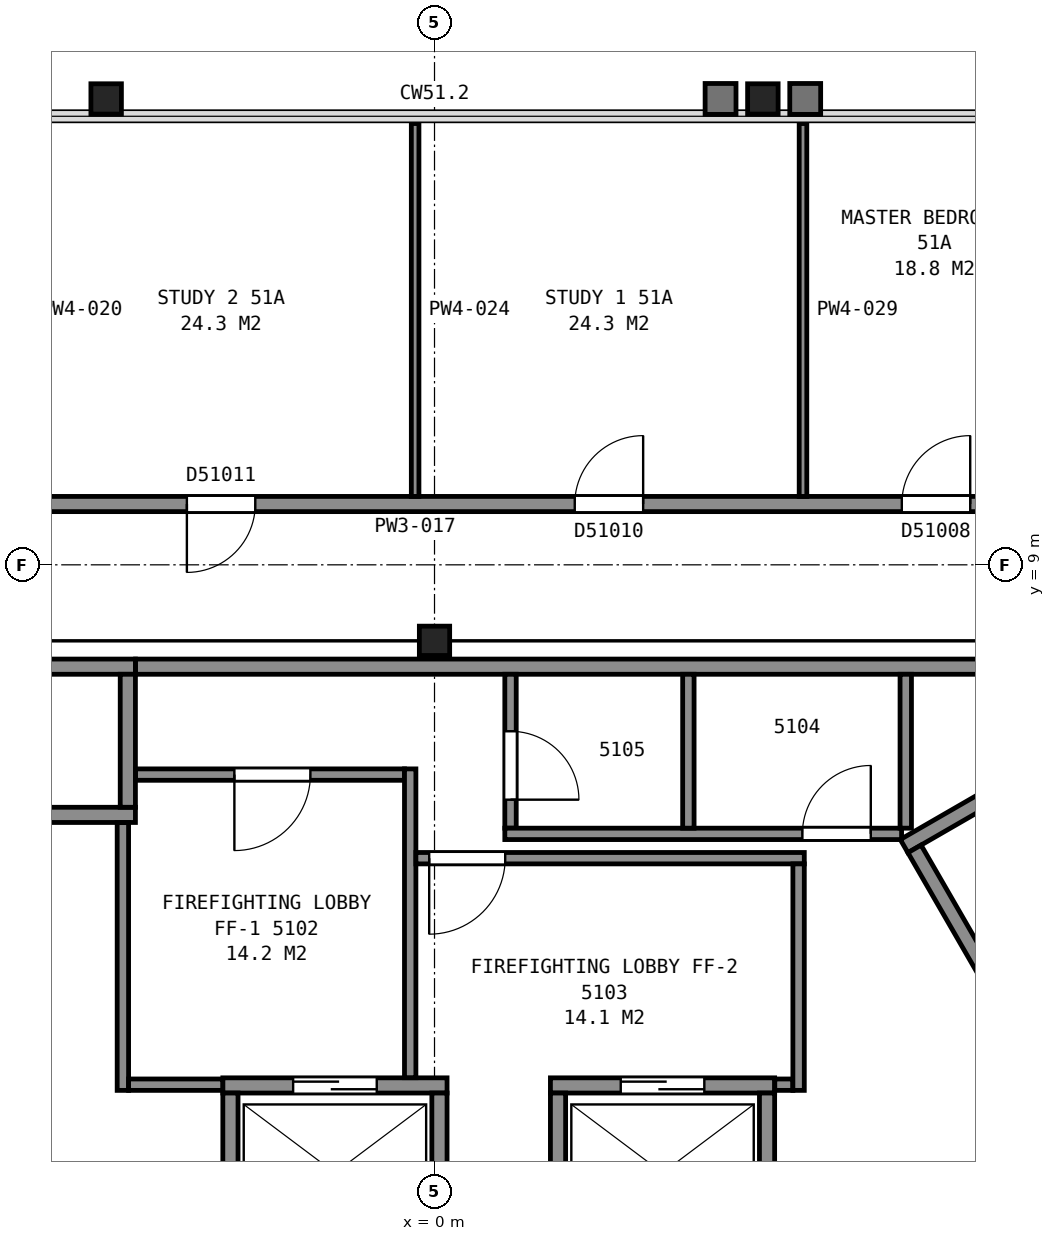
"""IFC4 building model, lengths in metres.
Left out: names, types, materials, properties, quantities, classifications, styles, units other than length and angle.
Written with IfcOpenShell. Run it as: python <this file> out.ifc"""

import sys

from ifc_helpers import new_model, si_unit, direction, frame, frame_2d, origin, origin_2d, place, context, subcontext, project, spatial, rectangle, i_section, extrude, element, fill, save


model = new_model("IFC4")
c1 = context("Model", 3, precision=1e-05, world=origin(), true_north=direction((0.0, 1.0)))
c2 = subcontext(c1, "Body", "Model", "MODEL_VIEW")
j1 = project(units=[si_unit("LENGTHUNIT", "METRE"), si_unit("PLANEANGLEUNIT", "RADIAN")], contexts=[c1])
p1 = place(None, origin())
s1 = spatial("IfcSite", under=j1, at=p1, CompositionType="ELEMENT")
p2 = place(p1, origin())
s2 = spatial("IfcBuilding", under=s1, at=p2, CompositionType="ELEMENT")
p3 = place(p2, frame((0.0, 0.0, 206.4)))
s3 = spatial("IfcBuildingStorey", under=s2, at=p3, CompositionType="ELEMENT", Elevation=206.4)
for number, where, z_axis, x_axis in (
    (1, (4.32, 15.13, 0.0), (0.0, 0.0, 1.0), (1.0, 0.0, 0.0)),
    (2, (-4.32, 15.13, 0.0), (0.0, 0.0, 1.0), (1.0, 0.0, 0.0)),
):
    element("IfcColumn", number, at=place(p3, frame(where, z_axis=z_axis, x_axis=x_axis)), inside=s3, PredefinedType="COLUMN", context=c2, shape_type="SweptSolid", body=[
        extrude(i_section(OverallWidth=0.401, OverallDepth=0.399, WebThickness=0.025, FlangeThickness=0.04, FilletRadius=0.015, at=origin_2d()), origin(), (0.0, 0.0, 1.0), 3.7),
    ])
p4 = place(p3, frame((0.0, 8.0, 0.0), z_axis=(0.0, 0.0, 1.0), x_axis=(1.0, 0.0, 0.0)))
e3 = element("IfcColumn", 3, at=p4, inside=s3, PredefinedType="COLUMN", context=c2, shape_type="SweptSolid", body=[
    extrude(i_section(OverallWidth=0.399, OverallDepth=0.386, WebThickness=0.021, FlangeThickness=0.033, FilletRadius=0.015, at=origin_2d()), origin(), (0.0, 0.0, 1.0), 3.7),
])
p5 = place(p3, frame((6.178, 5.299, 0.0), z_axis=(0.0, 0.0, 1.0), x_axis=(0.866019993635, 0.500009370536, 0.0)))
e4 = element("IfcWall", 4, at=p5, inside=s3, PredefinedType="PARTITIONING", context=c2, shape_type="SweptSolid", body=[
    extrude(rectangle(XDim=9.6, YDim=0.2, at=frame_2d((4.8, 0.0))), origin(), (0.0, 0.0, 1.0), 3.45),
])
p6 = place(p3, frame((7.715, 2.838, 0.0), z_axis=(0.0, 0.0, 1.0), x_axis=(-0.500049511043, 0.865996816683, 0.0)))
e5 = element("IfcWall", 5, at=p6, inside=s3, PredefinedType="PARTITIONING", context=c2, shape_type="SweptSolid", body=[
    extrude(rectangle(XDim=2.8, YDim=0.2, at=frame_2d((1.4, 0.0))), origin(), (0.0, 0.0, 1.0), 3.45),
])
p7 = place(p3, frame((-2.785, 2.15, 0.0), z_axis=(0.0, 0.0, 1.0), x_axis=(1.0, 0.0, 0.0)))
e6 = element("IfcWall", 6, at=p7, inside=s3, PredefinedType="PARTITIONING", context=c2, shape_type="SweptSolid", body=[
    extrude(rectangle(XDim=2.95, YDim=0.2, at=frame_2d((1.475, 0.0))), origin(), (0.0, 0.0, 1.0), 3.7),
])
p8 = place(p7, frame((0.925, 0.0, 0.0)))
e7 = element("IfcOpeningElement", 7, at=p8, cuts=e6, PredefinedType="OPENING", context=c2, shape_type="SweptSolid", body=[
    extrude(rectangle(XDim=1.1, YDim=2.1, at=frame_2d((0.55, 1.05))), frame((0.0, 0.11, 0.0), z_axis=(0.0, -1.0, 0.0), x_axis=(1.0, 0.0, 0.0)), (0.0, 0.0, 1.0), 0.22),
])
p9 = place(p3, frame((1.525, 2.15, 0.0), z_axis=(0.0, 0.0, 1.0), x_axis=(1.0, 0.0, 0.0)))
e8 = element("IfcWall", 8, at=p9, inside=s3, PredefinedType="PARTITIONING", context=c2, shape_type="SweptSolid", body=[
    extrude(rectangle(XDim=2.95, YDim=0.2, at=frame_2d((1.475, 0.0))), origin(), (0.0, 0.0, 1.0), 3.7),
])
p10 = place(p9, frame((0.925, 0.0, 0.0)))
e9 = element("IfcOpeningElement", 9, at=p10, cuts=e8, PredefinedType="OPENING", context=c2, shape_type="SweptSolid", body=[
    extrude(rectangle(XDim=1.1, YDim=2.1, at=frame_2d((0.55, 1.05))), frame((0.0, 0.11, 0.0), z_axis=(0.0, -1.0, 0.0), x_axis=(1.0, 0.0, 0.0)), (0.0, 0.0, 1.0), 0.22),
])
for number, where, z_axis, x_axis in (
    (10, (-6.285, 5.71, 0.0), (0.0, 0.0, 1.0), (1.0, 0.0, 0.0)),
    (11, (-6.285, 7.66, 0.0), (0.0, 0.0, 1.0), (1.0, 0.0, 0.0)),
):
    element("IfcWall", number, at=place(p3, frame(where, z_axis=z_axis, x_axis=x_axis)), inside=s3, PredefinedType="PARTITIONING", context=c2, shape_type="SweptSolid", body=[
        extrude(rectangle(XDim=2.35, YDim=0.2, at=frame_2d((1.175, 0.0))), origin(), (0.0, 0.0, 1.0), 3.7),
    ])
p11 = place(p3, frame((5.663, -1.612, 0.0), z_axis=(0.0, 0.0, 1.0), x_axis=(0.49998122708, 0.866036242063, 0.0)))
e12 = element("IfcWall", 12, at=p11, inside=s3, PredefinedType="PARTITIONING", context=c2, shape_type="SweptSolid", body=[
    extrude(rectangle(XDim=4.9, YDim=0.2, at=frame_2d((2.45, 0.0))), origin(), (0.0, 0.0, 1.0), 3.7),
])
for number, where, z_axis, x_axis in (
    (13, (4.375, 0.1, 0.0), (0.0, 0.0, 1.0), (0.0, 1.0, 0.0)),
    (14, (1.625, 0.1, 0.0), (0.0, 0.0, 1.0), (0.0, 1.0, 0.0)),
    (15, (0.065, 0.1, 0.0), (0.0, 0.0, 1.0), (0.0, 1.0, 0.0)),
    (16, (-2.685, 0.1, 0.0), (0.0, 0.0, 1.0), (0.0, 1.0, 0.0)),
):
    element("IfcWall", number, at=place(p3, frame(where, z_axis=z_axis, x_axis=x_axis)), inside=s3, PredefinedType="PARTITIONING", context=c2, shape_type="SweptSolid", body=[
        extrude(rectangle(XDim=1.95, YDim=0.2, at=frame_2d((0.975, 0.0))), origin(), (0.0, 0.0, 1.0), 3.7),
    ])
p12 = place(p3, frame((-4.035, 5.81, 0.0), z_axis=(0.0, 0.0, 1.0), x_axis=(0.0, 1.0, 0.0)))
e17 = element("IfcWall", 17, at=p12, inside=s3, PredefinedType="PARTITIONING", context=c2, shape_type="SweptSolid", body=[
    extrude(rectangle(XDim=1.75, YDim=0.2, at=frame_2d((0.875, 0.0))), origin(), (0.0, 0.0, 1.0), 3.7),
])
p13 = place(p3, frame((-4.1, 2.085, 0.0), z_axis=(0.0, 0.0, 1.0), x_axis=(0.0, 1.0, 0.0)))
e18 = element("IfcWall", 18, at=p13, inside=s3, PredefinedType="PARTITIONING", context=c2, shape_type="SweptSolid", body=[
    extrude(rectangle(XDim=3.523, YDim=0.15, at=frame_2d((1.761, 0.0))), origin(), (0.0, 0.0, 1.0), 3.45),
])
p14 = place(p3, frame((-4.025, 2.16, 0.0), z_axis=(0.0, 0.0, 1.0), x_axis=(1.0, 0.0, 0.0)))
e19 = element("IfcWall", 19, at=p14, inside=s3, PredefinedType="PARTITIONING", context=c2, shape_type="SweptSolid", body=[
    extrude(rectangle(XDim=1.238, YDim=0.15, at=frame_2d((0.619, 0.0))), origin(), (0.0, 0.0, 1.0), 3.45),
])
p15 = place(p3, frame((-3.933, 6.24, 0.0), z_axis=(0.0, 0.0, 1.0), x_axis=(1.0, 0.0, 0.0)))
e20 = element("IfcWall", 20, at=p15, inside=s3, PredefinedType="PARTITIONING", context=c2, shape_type="SweptSolid", body=[
    extrude(rectangle(XDim=3.538, YDim=0.15, at=frame_2d((1.769, 0.0))), origin(), (0.0, 0.0, 1.0), 3.45),
])
p16 = place(p15, frame((1.3, 0.0, 0.0)))
e21 = element("IfcOpeningElement", 21, at=p16, cuts=e20, PredefinedType="OPENING", context=c2, shape_type="SweptSolid", body=[
    extrude(rectangle(XDim=1.0, YDim=2.1, at=frame_2d((0.5, 1.05))), frame((0.0, 0.085, 0.0), z_axis=(0.0, -1.0, 0.0), x_axis=(1.0, 0.0, 0.0)), (0.0, 0.0, 1.0), 0.17),
])
p17 = place(p3, frame((-3.933, 7.66, 0.0), z_axis=(0.0, 0.0, 1.0), x_axis=(1.0, 0.0, 0.0)))
e22 = element("IfcWall", 22, at=p17, inside=s3, PredefinedType="PARTITIONING", context=c2, shape_type="SweptSolid", body=[
    extrude(rectangle(XDim=13.841, YDim=0.2, at=frame_2d((6.92, 0.0))), origin(), (0.0, 0.0, 1.0), 3.45),
])
p18 = place(p3, frame((-0.32, 2.252, 0.0), z_axis=(0.0, 0.0, 1.0), x_axis=(0.0, 1.0, 0.0)))
e23 = element("IfcWall", 23, at=p18, inside=s3, PredefinedType="PARTITIONING", context=c2, shape_type="SweptSolid", body=[
    extrude(rectangle(XDim=4.063, YDim=0.15, at=frame_2d((2.031, 0.0))), origin(), (0.0, 0.0, 1.0), 3.45),
])
p19 = place(p3, frame((-0.245, 5.14, 0.0), z_axis=(0.0, 0.0, 1.0), x_axis=(1.0, 0.0, 0.0)))
e24 = element("IfcWall", 24, at=p19, inside=s3, PredefinedType="PARTITIONING", context=c2, shape_type="SweptSolid", body=[
    extrude(rectangle(XDim=5.11, YDim=0.15, at=frame_2d((2.555, 0.0))), origin(), (0.0, 0.0, 1.0), 3.45),
])
p20 = place(p19, frame((0.175, 0.0, 0.0)))
e25 = element("IfcOpeningElement", 25, at=p20, cuts=e24, PredefinedType="OPENING", context=c2, shape_type="SweptSolid", body=[
    extrude(rectangle(XDim=1.0, YDim=2.1, at=frame_2d((0.5, 1.05))), frame((0.0, 0.085, 0.0), z_axis=(0.0, -1.0, 0.0), x_axis=(1.0, 0.0, 0.0)), (0.0, 0.0, 1.0), 0.17),
])
p21 = place(p3, frame((1.0, 7.56, 0.0), z_axis=(0.0, 0.0, 1.0), x_axis=(0.0, -1.0, 0.0)))
e26 = element("IfcWall", 26, at=p21, inside=s3, PredefinedType="PARTITIONING", context=c2, shape_type="SweptSolid", body=[
    extrude(rectangle(XDim=2.025, YDim=0.15, at=frame_2d((1.013, 0.0))), origin(), (0.0, 0.0, 1.0), 3.45),
])
p22 = place(p21, frame((0.75, 0.0, 0.0)))
e27 = element("IfcOpeningElement", 27, at=p22, cuts=e26, PredefinedType="OPENING", context=c2, shape_type="SweptSolid", body=[
    extrude(rectangle(XDim=0.9, YDim=2.1, at=frame_2d((0.45, 1.05))), frame((0.0, 0.085, 0.0), z_axis=(0.0, -1.0, 0.0), x_axis=(1.0, 0.0, 0.0)), (0.0, 0.0, 1.0), 0.17),
])
p23 = place(p3, frame((0.925, 5.46, 0.0), z_axis=(0.0, 0.0, 1.0), x_axis=(1.0, 0.0, 0.0)))
e28 = element("IfcWall", 28, at=p23, inside=s3, PredefinedType="PARTITIONING", context=c2, shape_type="SweptSolid", body=[
    extrude(rectangle(XDim=5.22, YDim=0.15, at=frame_2d((2.61, 0.0))), origin(), (0.0, 0.0, 1.0), 3.45),
])
p24 = place(p23, frame((3.915, 0.0, 0.0)))
e29 = element("IfcOpeningElement", 29, at=p24, cuts=e28, PredefinedType="OPENING", context=c2, shape_type="SweptSolid", body=[
    extrude(rectangle(XDim=0.9, YDim=2.1, at=frame_2d((0.45, 1.05))), frame((0.0, 0.085, 0.0), z_axis=(0.0, -1.0, 0.0), x_axis=(1.0, 0.0, 0.0)), (0.0, 0.0, 1.0), 0.17),
])
p25 = place(p3, frame((3.34, 5.535, 0.0), z_axis=(0.0, 0.0, 1.0), x_axis=(0.0, 1.0, 0.0)))
e30 = element("IfcWall", 30, at=p25, inside=s3, PredefinedType="PARTITIONING", context=c2, shape_type="SweptSolid", body=[
    extrude(rectangle(XDim=2.025, YDim=0.15, at=frame_2d((1.013, 0.0))), origin(), (0.0, 0.0, 1.0), 3.45),
])
p26 = place(p3, frame((4.477, 2.16, 0.0), z_axis=(0.0, 0.0, 1.0), x_axis=(1.0, 0.0, 0.0)))
e31 = element("IfcWall", 31, at=p26, inside=s3, PredefinedType="PARTITIONING", context=c2, shape_type="SweptSolid", body=[
    extrude(rectangle(XDim=0.238, YDim=0.15, at=frame_2d((0.119, 0.0))), origin(), (0.0, 0.0, 1.0), 3.45),
])
p27 = place(p3, frame((4.79, 2.085, 0.0), z_axis=(0.0, 0.0, 1.0), x_axis=(0.0, 1.0, 0.0)))
e32 = element("IfcWall", 32, at=p27, inside=s3, PredefinedType="PARTITIONING", context=c2, shape_type="SweptSolid", body=[
    extrude(rectangle(XDim=2.98, YDim=0.15, at=frame_2d((1.49, 0.0))), origin(), (0.0, 0.0, 1.0), 3.45),
])
p28 = place(p3, frame((6.2, 5.535, 0.0), z_axis=(0.0, 0.0, 1.0), x_axis=(0.0, 1.0, 0.0)))
e33 = element("IfcWall", 33, at=p28, inside=s3, PredefinedType="PARTITIONING", context=c2, shape_type="SweptSolid", body=[
    extrude(rectangle(XDim=2.025, YDim=0.15, at=frame_2d((1.013, 0.0))), origin(), (0.0, 0.0, 1.0), 3.45),
])
p29 = place(p3, frame((-4.075, -12.545, 0.0), z_axis=(0.0, 0.0, 1.0), x_axis=(-0.499999743747, 0.866025551732, 0.0)))
e34 = element("IfcWall", 34, at=p29, inside=s3, PredefinedType="PARTITIONING", context=c2, shape_type="SweptSolid", body=[
    extrude(rectangle(XDim=17.656, YDim=0.2, at=frame_2d((8.828, 0.0))), origin(), (0.0, 0.0, 1.0), 2.713),
])
p30 = place(p29, frame((9.895, 0.0, 0.0)))
e35 = element("IfcOpeningElement", 35, at=p30, cuts=e34, PredefinedType="OPENING", context=c2, shape_type="SweptSolid", body=[
    extrude(rectangle(XDim=0.9, YDim=2.1, at=frame_2d((0.45, 1.05))), frame((0.0, 0.11, 0.0), z_axis=(0.0, -1.0, 0.0), x_axis=(1.0, 0.0, 0.0)), (0.0, 0.0, 1.0), 0.22),
])
p31 = place(p29, frame((6.622, 0.0, 0.0)))
e36 = element("IfcOpeningElement", 36, at=p31, cuts=e34, PredefinedType="OPENING", context=c2, shape_type="SweptSolid", body=[
    extrude(rectangle(XDim=0.9, YDim=2.1, at=frame_2d((0.45, 1.05))), frame((0.0, 0.11, 0.0), z_axis=(0.0, -1.0, 0.0), x_axis=(1.0, 0.0, 0.0)), (0.0, 0.0, 1.0), 0.22),
])
p32 = place(p29, frame((0.268, 0.0, 0.0)))
e37 = element("IfcOpeningElement", 37, at=p32, cuts=e34, PredefinedType="OPENING", context=c2, shape_type="SweptSolid", body=[
    extrude(rectangle(XDim=0.9, YDim=2.1, at=frame_2d((0.45, 1.05))), frame((0.0, 0.11, 0.0), z_axis=(0.0, -1.0, 0.0), x_axis=(1.0, 0.0, 0.0)), (0.0, 0.0, 1.0), 0.22),
])
p33 = place(p3, frame((-8.828, 9.8, 0.0), z_axis=(0.0, 0.0, 1.0), x_axis=(1.0, 0.0, 0.0)))
e38 = element("IfcWall", 38, at=p33, inside=s3, PredefinedType="PARTITIONING", context=c2, shape_type="SweptSolid", body=[
    extrude(rectangle(XDim=17.706, YDim=0.2, at=frame_2d((8.853, 0.0))), origin(), (0.0, 0.0, 1.0), 2.713),
])
p34 = place(p33, frame((14.976, 0.0, 0.0)))
e39 = element("IfcOpeningElement", 39, at=p34, cuts=e38, PredefinedType="OPENING", context=c2, shape_type="SweptSolid", body=[
    extrude(rectangle(XDim=0.9, YDim=2.1, at=frame_2d((0.45, 1.05))), frame((0.0, 0.11, 0.0), z_axis=(0.0, -1.0, 0.0), x_axis=(1.0, 0.0, 0.0)), (0.0, 0.0, 1.0), 0.22),
])
p35 = place(p33, frame((10.673, 0.0, 0.0)))
e40 = element("IfcOpeningElement", 40, at=p35, cuts=e38, PredefinedType="OPENING", context=c2, shape_type="SweptSolid", body=[
    extrude(rectangle(XDim=0.9, YDim=2.1, at=frame_2d((0.45, 1.05))), frame((0.0, 0.11, 0.0), z_axis=(0.0, -1.0, 0.0), x_axis=(1.0, 0.0, 0.0)), (0.0, 0.0, 1.0), 0.22),
])
p36 = place(p33, frame((5.57, 0.0, 0.0)))
e41 = element("IfcOpeningElement", 41, at=p36, cuts=e38, PredefinedType="OPENING", context=c2, shape_type="SweptSolid", body=[
    extrude(rectangle(XDim=0.9, YDim=2.1, at=frame_2d((0.45, 1.05))), frame((0.0, 0.11, 0.0), z_axis=(0.0, -1.0, 0.0), x_axis=(1.0, 0.0, 0.0)), (0.0, 0.0, 1.0), 0.22),
])
p37 = place(p33, frame((1.3, 0.0, 0.0)))
e42 = element("IfcOpeningElement", 42, at=p37, cuts=e38, PredefinedType="OPENING", context=c2, shape_type="SweptSolid", body=[
    extrude(rectangle(XDim=0.9, YDim=2.1, at=frame_2d((0.45, 1.05))), frame((0.0, 0.11, 0.0), z_axis=(0.0, -1.0, 0.0), x_axis=(1.0, 0.0, 0.0)), (0.0, 0.0, 1.0), 0.22),
])
p38 = place(p3, frame((-0.255, 9.9, 0.0), z_axis=(0.0, 0.0, 1.0), x_axis=(0.0, 1.0, 0.0)))
e43 = element("IfcWall", 43, at=p38, inside=s3, PredefinedType="PARTITIONING", context=c2, shape_type="SweptSolid", body=[
    extrude(rectangle(XDim=4.906, YDim=0.1, at=frame_2d((2.453, 0.0))), origin(), (0.0, 0.0, 1.0), 2.713),
])
p39 = place(p3, frame((12.903, 2.745, 0.0), z_axis=(0.0, 0.0, 1.0), x_axis=(-0.499999743747, -0.866025551732, 0.0)))
e44 = element("IfcWall", 44, at=p39, inside=s3, PredefinedType="PARTITIONING", context=c2, shape_type="SweptSolid", body=[
    extrude(rectangle(XDim=17.656, YDim=0.2, at=frame_2d((8.828, 0.0))), origin(), (0.0, 0.0, 1.0), 2.713),
])
p40 = place(p39, frame((12.756, 0.0, 0.0)))
e45 = element("IfcOpeningElement", 45, at=p40, cuts=e44, PredefinedType="OPENING", context=c2, shape_type="SweptSolid", body=[
    extrude(rectangle(XDim=1.2, YDim=2.1, at=frame_2d((0.6, 1.05))), frame((0.0, 0.11, 0.0), z_axis=(0.0, -1.0, 0.0), x_axis=(1.0, 0.0, 0.0)), (0.0, 0.0, 1.0), 0.22),
])
p41 = place(p39, frame((7.044, 0.0, 0.0)))
e46 = element("IfcOpeningElement", 46, at=p41, cuts=e44, PredefinedType="OPENING", context=c2, shape_type="SweptSolid", body=[
    extrude(rectangle(XDim=0.9, YDim=2.1, at=frame_2d((0.45, 1.05))), frame((0.0, 0.11, 0.0), z_axis=(0.0, -1.0, 0.0), x_axis=(1.0, 0.0, 0.0)), (0.0, 0.0, 1.0), 0.22),
])
p42 = place(p39, frame((0.417, 0.0, 0.0)))
e47 = element("IfcOpeningElement", 47, at=p42, cuts=e44, PredefinedType="OPENING", context=c2, shape_type="SweptSolid", body=[
    extrude(rectangle(XDim=0.9, YDim=2.1, at=frame_2d((0.45, 1.05))), frame((0.0, 0.11, 0.0), z_axis=(0.0, -1.0, 0.0), x_axis=(1.0, 0.0, 0.0)), (0.0, 0.0, 1.0), 0.22),
])
p43 = place(p3, frame((4.848, 9.9, 0.0), z_axis=(0.0, 0.0, 1.0), x_axis=(0.0, 1.0, 0.0)))
e48 = element("IfcWall", 48, at=p43, inside=s3, PredefinedType="PARTITIONING", context=c2, shape_type="SweptSolid", body=[
    extrude(rectangle(XDim=4.906, YDim=0.1, at=frame_2d((2.453, 0.0))), origin(), (0.0, 0.0, 1.0), 2.713),
])
p44 = place(p8, origin())
e49 = element("IfcDoor", 49, at=p44, inside=s3, OperationType="SLIDING_TO_LEFT", PredefinedType="DOOR", context=c2, shape_type="SweptSolid", body=[
    extrude(rectangle(XDim=1.1, YDim=2.1, at=frame_2d((0.55, 1.05))), frame((0.0, 0.025, 0.0), z_axis=(0.0, -1.0, 0.0), x_axis=(1.0, 0.0, 0.0)), (0.0, 0.0, 1.0), 0.05),
])
fill(e7, e49)
p45 = place(p10, origin())
e50 = element("IfcDoor", 50, at=p45, inside=s3, OperationType="SLIDING_TO_RIGHT", PredefinedType="DOOR", context=c2, shape_type="SweptSolid", body=[
    extrude(rectangle(XDim=1.1, YDim=2.1, at=frame_2d((0.55, 1.05))), frame((0.0, 0.025, 0.0), z_axis=(0.0, -1.0, 0.0), x_axis=(1.0, 0.0, 0.0)), (0.0, 0.0, 1.0), 0.05),
])
fill(e9, e50)
p46 = place(p16, origin())
e51 = element("IfcDoor", 51, at=p46, inside=s3, OperationType="SINGLE_SWING_LEFT", PredefinedType="DOOR", context=c2, shape_type="SweptSolid", body=[
    extrude(rectangle(XDim=1.0, YDim=2.1, at=frame_2d((0.5, 1.05))), frame((0.0, 0.025, 0.0), z_axis=(0.0, -1.0, 0.0), x_axis=(1.0, 0.0, 0.0)), (0.0, 0.0, 1.0), 0.05),
])
fill(e21, e51)
p47 = place(p20, origin())
e52 = element("IfcDoor", 52, at=p47, inside=s3, OperationType="SINGLE_SWING_LEFT", PredefinedType="DOOR", context=c2, shape_type="SweptSolid", body=[
    extrude(rectangle(XDim=1.0, YDim=2.1, at=frame_2d((0.5, 1.05))), frame((0.0, 0.025, 0.0), z_axis=(0.0, -1.0, 0.0), x_axis=(1.0, 0.0, 0.0)), (0.0, 0.0, 1.0), 0.05),
])
fill(e25, e52)
p48 = place(p22, origin())
e53 = element("IfcDoor", 53, at=p48, inside=s3, OperationType="SINGLE_SWING_RIGHT", PredefinedType="DOOR", context=c2, shape_type="SweptSolid", body=[
    extrude(rectangle(XDim=0.9, YDim=2.1, at=frame_2d((0.45, 1.05))), frame((0.0, 0.025, 0.0), z_axis=(0.0, -1.0, 0.0), x_axis=(1.0, 0.0, 0.0)), (0.0, 0.0, 1.0), 0.05),
])
fill(e27, e53)
p49 = place(p24, origin())
e54 = element("IfcDoor", 54, at=p49, inside=s3, OperationType="SINGLE_SWING_RIGHT", PredefinedType="DOOR", context=c2, shape_type="SweptSolid", body=[
    extrude(rectangle(XDim=0.9, YDim=2.1, at=frame_2d((0.45, 1.05))), frame((0.0, 0.025, 0.0), z_axis=(0.0, -1.0, 0.0), x_axis=(1.0, 0.0, 0.0)), (0.0, 0.0, 1.0), 0.05),
])
fill(e29, e54)
p50 = place(p34, origin())
e55 = element("IfcDoor", 55, at=p50, inside=s3, OperationType="SINGLE_SWING_RIGHT", PredefinedType="DOOR", context=c2, shape_type="SweptSolid", body=[
    extrude(rectangle(XDim=0.9, YDim=2.1, at=frame_2d((0.45, 1.05))), frame((0.0, 0.025, 0.0), z_axis=(0.0, -1.0, 0.0), x_axis=(1.0, 0.0, 0.0)), (0.0, 0.0, 1.0), 0.05),
])
fill(e39, e55)
p51 = place(p35, origin())
e56 = element("IfcDoor", 56, at=p51, inside=s3, OperationType="SINGLE_SWING_RIGHT", PredefinedType="DOOR", context=c2, shape_type="SweptSolid", body=[
    extrude(rectangle(XDim=0.9, YDim=2.1, at=frame_2d((0.45, 1.05))), frame((0.0, 0.025, 0.0), z_axis=(0.0, -1.0, 0.0), x_axis=(1.0, 0.0, 0.0)), (0.0, 0.0, 1.0), 0.05),
])
fill(e40, e56)
p52 = place(p36, origin())
e57 = element("IfcDoor", 57, at=p52, inside=s3, OperationType="SINGLE_SWING_LEFT", PredefinedType="DOOR", context=c2, shape_type="SweptSolid", body=[
    extrude(rectangle(XDim=0.9, YDim=2.1, at=frame_2d((0.45, 1.05))), frame((0.0, 0.025, 0.0), z_axis=(0.0, -1.0, 0.0), x_axis=(1.0, 0.0, 0.0)), (0.0, 0.0, 1.0), 0.05),
])
fill(e41, e57)
save(model, sys.argv[1])
